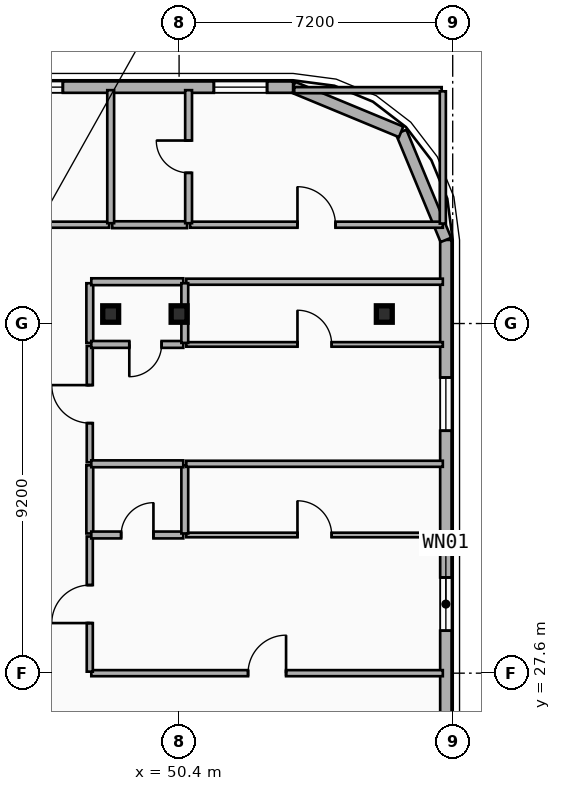
"""IFC4 building model, lengths in metres.
Left out: names, types, materials, properties, quantities, classifications, styles, units other than length and angle.
Written with IfcOpenShell. Run it as: python <this file> out.ifc"""

import sys

from ifc_helpers import new_model, si_unit, direction, frame, frame_2d, origin, origin_2d, place, context, subcontext, project, spatial, rectangle, i_section, extrude, element, fill, save


model = new_model("IFC4")
c1 = context("Model", 3, precision=1e-05, world=origin(), true_north=direction((0.0, 1.0)))
c2 = subcontext(c1, "Body", "Model", "MODEL_VIEW")
j1 = project(units=[si_unit("LENGTHUNIT", "METRE"), si_unit("PLANEANGLEUNIT", "RADIAN")], contexts=[c1])
p1 = place(None, origin())
s1 = spatial("IfcSite", under=j1, at=p1, CompositionType="ELEMENT")
p2 = place(p1, origin())
s2 = spatial("IfcBuilding", under=s1, at=p2, CompositionType="ELEMENT")
p3 = place(p2, frame((0.0, 0.0, 101.3)))
s3 = spatial("IfcBuildingStorey", under=s2, at=p3, CompositionType="ELEMENT", Elevation=101.3)
for number, where, z_axis, x_axis in (
    (1, (48.6, 37.05, 0.0), (0.0, 0.0, 1.0), (1.0, 0.0, 0.0)),
    (2, (50.4, 37.05, 0.0), (0.0, 0.0, 1.0), (1.0, 0.0, 0.0)),
    (3, (55.8, 37.05, 0.0), (0.0, 0.0, 1.0), (1.0, 0.0, 0.0)),
):
    element("IfcColumn", number, at=place(p3, frame(where, z_axis=z_axis, x_axis=x_axis)), inside=s3, PredefinedType="COLUMN", context=c2, shape_type="SweptSolid", body=[
        extrude(i_section(OverallWidth=0.418, OverallDepth=0.432, WebThickness=0.035, FlangeThickness=0.056, FilletRadius=0.015, at=origin_2d()), origin(), (0.0, 0.0, 1.0), 3.5),
    ])
p4 = place(p3, frame((57.42, 39.0, 0.0), z_axis=(0.0, 0.0, 1.0), x_axis=(0.0, -1.0, 0.0)))
e4 = element("IfcWall", 4, at=p4, inside=s3, PredefinedType="SOLIDWALL", context=c2, shape_type="SweptSolid", body=[
    extrude(rectangle(XDim=18.0, YDim=0.3, at=frame_2d((9.0, 0.0))), origin(), (0.0, 0.0, 1.0), 3.24),
])
p5 = place(p4, frame((8.882, 0.0, 0.48)))
e5 = element("IfcOpeningElement", 5, at=p5, cuts=e4, PredefinedType="OPENING", context=c2, shape_type="SweptSolid", body=[
    extrude(rectangle(XDim=1.4, YDim=1.8, at=frame_2d((0.7, 0.9))), frame((0.0, 0.16, 0.0), z_axis=(0.0, -1.0, 0.0), x_axis=(1.0, 0.0, 0.0)), (0.0, 0.0, 1.0), 0.32),
])
p6 = place(p4, frame((3.621, 0.0, 0.48)))
e6 = element("IfcOpeningElement", 6, at=p6, cuts=e4, PredefinedType="OPENING", context=c2, shape_type="SweptSolid", body=[
    extrude(rectangle(XDim=1.4, YDim=1.8, at=frame_2d((0.7, 0.9))), frame((0.0, 0.16, 0.0), z_axis=(0.0, -1.0, 0.0), x_axis=(1.0, 0.0, 0.0)), (0.0, 0.0, 1.0), 0.32),
])
p7 = place(p4, frame((14.655, 0.0, 0.48)))
e7 = element("IfcOpeningElement", 7, at=p7, cuts=e4, PredefinedType="OPENING", context=c2, shape_type="SweptSolid", body=[
    extrude(rectangle(XDim=1.4, YDim=1.8, at=frame_2d((0.7, 0.9))), frame((0.0, 0.16, 0.0), z_axis=(0.0, -1.0, 0.0), x_axis=(1.0, 0.0, 0.0)), (0.0, 0.0, 1.0), 0.32),
])
p8 = place(p3, frame((56.243, 41.843, 0.0), z_axis=(0.0, 0.0, 1.0), x_axis=(0.382636798336, -0.92389884758, 0.0)))
e8 = element("IfcWall", 8, at=p8, inside=s3, PredefinedType="SOLIDWALL", context=c2, shape_type="SweptSolid", body=[
    extrude(rectangle(XDim=3.077, YDim=0.3, at=frame_2d((1.538, 0.0))), origin(), (0.0, 0.0, 1.0), 3.24),
])
p9 = place(p3, frame((53.4, 43.02, 0.0), z_axis=(0.0, 0.0, 1.0), x_axis=(0.923882414032, -0.382676475685, 0.0)))
e9 = element("IfcWall", 9, at=p9, inside=s3, PredefinedType="SOLIDWALL", context=c2, shape_type="SweptSolid", body=[
    extrude(rectangle(XDim=3.077, YDim=0.3, at=frame_2d((1.539, 0.0))), origin(), (0.0, 0.0, 1.0), 3.24),
])
p10 = place(p3, frame((4.2, 43.02, 0.0), z_axis=(0.0, 0.0, 1.0), x_axis=(1.0, 0.0, 0.0)))
e10 = element("IfcWall", 10, at=p10, inside=s3, PredefinedType="SOLIDWALL", context=c2, shape_type="SweptSolid", body=[
    extrude(rectangle(XDim=49.2, YDim=0.3, at=frame_2d((24.6, 0.0))), origin(), (0.0, 0.0, 1.0), 3.24),
])
p11 = place(p10, frame((11.657, 0.0, 0.85)))
e11 = element("IfcOpeningElement", 11, at=p11, cuts=e10, PredefinedType="OPENING", context=c2, shape_type="SweptSolid", body=[
    extrude(rectangle(XDim=1.4, YDim=1.8, at=frame_2d((0.7, 0.9))), frame((0.0, 0.16, 0.0), z_axis=(0.0, -1.0, 0.0), x_axis=(1.0, 0.0, 0.0)), (0.0, 0.0, 1.0), 0.32),
])
p12 = place(p10, frame((20.053, 0.0, 0.85)))
e12 = element("IfcOpeningElement", 12, at=p12, cuts=e10, PredefinedType="OPENING", context=c2, shape_type="SweptSolid", body=[
    extrude(rectangle(XDim=1.4, YDim=1.8, at=frame_2d((0.7, 0.9))), frame((0.0, 0.16, 0.0), z_axis=(0.0, -1.0, 0.0), x_axis=(1.0, 0.0, 0.0)), (0.0, 0.0, 1.0), 0.32),
])
p13 = place(p10, frame((29.789, 0.0, 0.85)))
e13 = element("IfcOpeningElement", 13, at=p13, cuts=e10, PredefinedType="OPENING", context=c2, shape_type="SweptSolid", body=[
    extrude(rectangle(XDim=1.4, YDim=1.8, at=frame_2d((0.7, 0.9))), frame((0.0, 0.16, 0.0), z_axis=(0.0, -1.0, 0.0), x_axis=(1.0, 0.0, 0.0)), (0.0, 0.0, 1.0), 0.32),
])
p14 = place(p10, frame((31.928, 0.0, 0.85)))
e14 = element("IfcOpeningElement", 14, at=p14, cuts=e10, PredefinedType="OPENING", context=c2, shape_type="SweptSolid", body=[
    extrude(rectangle(XDim=1.4, YDim=1.8, at=frame_2d((0.7, 0.9))), frame((0.0, 0.16, 0.0), z_axis=(0.0, -1.0, 0.0), x_axis=(1.0, 0.0, 0.0)), (0.0, 0.0, 1.0), 0.32),
])
p15 = place(p10, frame((39.382, 0.0, 0.85)))
e15 = element("IfcOpeningElement", 15, at=p15, cuts=e10, PredefinedType="OPENING", context=c2, shape_type="SweptSolid", body=[
    extrude(rectangle(XDim=1.4, YDim=1.8, at=frame_2d((0.7, 0.9))), frame((0.0, 0.16, 0.0), z_axis=(0.0, -1.0, 0.0), x_axis=(1.0, 0.0, 0.0)), (0.0, 0.0, 1.0), 0.32),
])
p16 = place(p10, frame((41.741, 0.0, 0.85)))
e16 = element("IfcOpeningElement", 16, at=p16, cuts=e10, PredefinedType="OPENING", context=c2, shape_type="SweptSolid", body=[
    extrude(rectangle(XDim=1.4, YDim=1.8, at=frame_2d((0.7, 0.9))), frame((0.0, 0.16, 0.0), z_axis=(0.0, -1.0, 0.0), x_axis=(1.0, 0.0, 0.0)), (0.0, 0.0, 1.0), 0.32),
])
p17 = place(p10, frame((47.115, 0.0, 0.85)))
e17 = element("IfcOpeningElement", 17, at=p17, cuts=e10, PredefinedType="OPENING", context=c2, shape_type="SweptSolid", body=[
    extrude(rectangle(XDim=1.4, YDim=1.8, at=frame_2d((0.7, 0.9))), frame((0.0, 0.16, 0.0), z_axis=(0.0, -1.0, 0.0), x_axis=(1.0, 0.0, 0.0)), (0.0, 0.0, 1.0), 0.32),
])
p18 = place(p3, frame((48.09, 27.6, 0.0), z_axis=(0.0, 0.0, 1.0), x_axis=(1.0, 0.0, 0.0)))
e18 = element("IfcWall", 18, at=p18, inside=s3, PredefinedType="PARTITIONING", context=c2, shape_type="SweptSolid", body=[
    extrude(rectangle(XDim=9.25, YDim=0.16, at=frame_2d((4.625, 0.0))), origin(), (0.0, 0.0, 1.0), 2.57),
])
p19 = place(p18, frame((4.125, 0.0, 0.0)))
e19 = element("IfcOpeningElement", 19, at=p19, cuts=e18, PredefinedType="OPENING", context=c2, shape_type="SweptSolid", body=[
    extrude(rectangle(XDim=1.0, YDim=2.15, at=frame_2d((0.5, 1.075))), frame((0.0, 0.09, 0.0), z_axis=(0.0, -1.0, 0.0), x_axis=(1.0, 0.0, 0.0)), (0.0, 0.0, 1.0), 0.18),
])
p20 = place(p3, frame((48.05, 27.64, 0.0), z_axis=(0.0, 0.0, 1.0), x_axis=(0.0, 1.0, 0.0)))
e20 = element("IfcWall", 20, at=p20, inside=s3, PredefinedType="PARTITIONING", context=c2, shape_type="SweptSolid", body=[
    extrude(rectangle(XDim=3.556, YDim=0.16, at=frame_2d((1.778, 0.0))), origin(), (0.0, 0.0, 1.0), 3.24),
])
p21 = place(p20, frame((1.278, 0.0, 0.0)))
e21 = element("IfcOpeningElement", 21, at=p21, cuts=e20, PredefinedType="OPENING", context=c2, shape_type="SweptSolid", body=[
    extrude(rectangle(XDim=1.0, YDim=2.15, at=frame_2d((0.5, 1.075))), frame((0.0, 0.09, 0.0), z_axis=(0.0, -1.0, 0.0), x_axis=(1.0, 0.0, 0.0)), (0.0, 0.0, 1.0), 0.18),
])
p22 = place(p3, frame((48.05, 31.276, 0.0), z_axis=(0.0, 0.0, 1.0), x_axis=(0.0, 1.0, 0.0)))
e22 = element("IfcWall", 22, at=p22, inside=s3, PredefinedType="PLUMBINGWALL", context=c2, shape_type="SweptSolid", body=[
    extrude(rectangle(XDim=1.793, YDim=0.18, at=frame_2d((0.896, 0.0))), origin(), (0.0, 0.0, 1.0), 3.24),
])
p23 = place(p3, frame((48.05, 33.149, 0.0), z_axis=(0.0, 0.0, 1.0), x_axis=(0.0, 1.0, 0.0)))
e23 = element("IfcWall", 23, at=p23, inside=s3, PredefinedType="PARTITIONING", context=c2, shape_type="SweptSolid", body=[
    extrude(rectangle(XDim=3.061, YDim=0.16, at=frame_2d((1.531, 0.0))), origin(), (0.0, 0.0, 1.0), 3.24),
])
p24 = place(p23, frame((1.031, 0.0, 0.0)))
e24 = element("IfcOpeningElement", 24, at=p24, cuts=e23, PredefinedType="OPENING", context=c2, shape_type="SweptSolid", body=[
    extrude(rectangle(XDim=1.0, YDim=2.15, at=frame_2d((0.5, 1.075))), frame((0.0, 0.09, 0.0), z_axis=(0.0, -1.0, 0.0), x_axis=(1.0, 0.0, 0.0)), (0.0, 0.0, 1.0), 0.18),
])
p25 = place(p3, frame((48.05, 36.29, 0.0), z_axis=(0.0, 0.0, 1.0), x_axis=(0.0, 1.0, 0.0)))
e25 = element("IfcWall", 25, at=p25, inside=s3, PredefinedType="PLUMBINGWALL", context=c2, shape_type="SweptSolid", body=[
    extrude(rectangle(XDim=1.57, YDim=0.18, at=frame_2d((0.785, 0.0))), origin(), (0.0, 0.0, 1.0), 2.72),
])
p26 = place(p3, frame((48.09, 37.9, 0.0), z_axis=(0.0, 0.0, 1.0), x_axis=(1.0, 0.0, 0.0)))
e26 = element("IfcWall", 26, at=p26, inside=s3, PredefinedType="PLUMBINGWALL", context=c2, shape_type="SweptSolid", body=[
    extrude(rectangle(XDim=2.42, YDim=0.18, at=frame_2d((1.21, 0.0))), origin(), (0.0, 0.0, 1.0), 3.24),
])
p27 = place(p3, frame((50.59, 37.9, 0.0), z_axis=(0.0, 0.0, 1.0), x_axis=(1.0, 0.0, 0.0)))
e27 = element("IfcWall", 27, at=p27, inside=s3, PredefinedType="PARTITIONING", context=c2, shape_type="SweptSolid", body=[
    extrude(rectangle(XDim=6.75, YDim=0.16, at=frame_2d((3.375, 0.0))), origin(), (0.0, 0.0, 1.0), 3.24),
])
p28 = place(p3, frame((42.363, 39.4, 0.0), z_axis=(0.0, 0.0, 1.0), x_axis=(1.0, 0.0, 0.0)))
e28 = element("IfcWall", 28, at=p28, inside=s3, PredefinedType="PARTITIONING", context=c2, shape_type="SweptSolid", body=[
    extrude(rectangle(XDim=6.197, YDim=0.16, at=frame_2d((3.099, 0.0))), origin(), (0.0, 0.0, 1.0), 3.24),
])
p29 = place(p28, frame((2.598, 0.0, 0.0)))
e29 = element("IfcOpeningElement", 29, at=p29, cuts=e28, PredefinedType="OPENING", context=c2, shape_type="SweptSolid", body=[
    extrude(rectangle(XDim=1.0, YDim=2.15, at=frame_2d((0.5, 1.075))), frame((0.0, 0.09, 0.0), z_axis=(0.0, -1.0, 0.0), x_axis=(1.0, 0.0, 0.0)), (0.0, 0.0, 1.0), 0.18),
])
p30 = place(p3, frame((50.69, 39.4, 0.0), z_axis=(0.0, 0.0, 1.0), x_axis=(1.0, 0.0, 0.0)))
e30 = element("IfcWall", 30, at=p30, inside=s3, PredefinedType="PARTITIONING", context=c2, shape_type="SweptSolid", body=[
    extrude(rectangle(XDim=6.65, YDim=0.16, at=frame_2d((3.325, 0.0))), origin(), (0.0, 0.0, 1.0), 3.24),
])
p31 = place(p30, frame((2.825, 0.0, 0.0)))
e31 = element("IfcOpeningElement", 31, at=p31, cuts=e30, PredefinedType="OPENING", context=c2, shape_type="SweptSolid", body=[
    extrude(rectangle(XDim=1.0, YDim=2.15, at=frame_2d((0.5, 1.075))), frame((0.0, 0.09, 0.0), z_axis=(0.0, -1.0, 0.0), x_axis=(1.0, 0.0, 0.0)), (0.0, 0.0, 1.0), 0.18),
])
p32 = place(p3, frame((48.64, 39.4, 0.0), z_axis=(0.0, 0.0, 1.0), x_axis=(1.0, 0.0, 0.0)))
e32 = element("IfcWall", 32, at=p32, inside=s3, PredefinedType="PLUMBINGWALL", context=c2, shape_type="SweptSolid", body=[
    extrude(rectangle(XDim=1.97, YDim=0.18, at=frame_2d((0.985, 0.0))), origin(), (0.0, 0.0, 1.0), 3.24),
])
p33 = place(p3, frame((48.09, 31.236, 0.0), z_axis=(0.0, 0.0, 1.0), x_axis=(1.0, 0.0, 0.0)))
e33 = element("IfcWall", 33, at=p33, inside=s3, PredefinedType="PLUMBINGWALL", context=c2, shape_type="SweptSolid", body=[
    extrude(rectangle(XDim=2.42, YDim=0.18, at=frame_2d((1.21, 0.0))), origin(), (0.0, 0.0, 1.0), 2.57),
])
p34 = place(p33, frame((0.785, 0.0, 0.0)))
e34 = element("IfcOpeningElement", 34, at=p34, cuts=e33, PredefinedType="OPENING", context=c2, shape_type="SweptSolid", body=[
    extrude(rectangle(XDim=0.85, YDim=2.1, at=frame_2d((0.425, 1.05))), frame((0.0, 0.1, 0.0), z_axis=(0.0, -1.0, 0.0), x_axis=(1.0, 0.0, 0.0)), (0.0, 0.0, 1.0), 0.2),
])
p35 = place(p3, frame((50.59, 31.236, 0.0), z_axis=(0.0, 0.0, 1.0), x_axis=(1.0, 0.0, 0.0)))
e35 = element("IfcWall", 35, at=p35, inside=s3, PredefinedType="PARTITIONING", context=c2, shape_type="SweptSolid", body=[
    extrude(rectangle(XDim=6.75, YDim=0.12, at=frame_2d((3.375, 0.0))), origin(), (0.0, 0.0, 1.0), 2.57),
])
p36 = place(p35, frame((2.925, 0.0, 0.0)))
e36 = element("IfcOpeningElement", 36, at=p36, cuts=e35, PredefinedType="OPENING", context=c2, shape_type="SweptSolid", body=[
    extrude(rectangle(XDim=0.9, YDim=2.1, at=frame_2d((0.45, 1.05))), frame((0.0, 0.07, 0.0), z_axis=(0.0, -1.0, 0.0), x_axis=(1.0, 0.0, 0.0)), (0.0, 0.0, 1.0), 0.14),
])
p37 = place(p3, frame((50.55, 31.276, 0.0), z_axis=(0.0, 0.0, 1.0), x_axis=(0.0, 1.0, 0.0)))
e37 = element("IfcWall", 37, at=p37, inside=s3, PredefinedType="PLUMBINGWALL", context=c2, shape_type="SweptSolid", body=[
    extrude(rectangle(XDim=1.793, YDim=0.18, at=frame_2d((0.896, 0.0))), origin(), (0.0, 0.0, 1.0), 2.57),
])
p38 = place(p3, frame((48.09, 33.109, 0.0), z_axis=(0.0, 0.0, 1.0), x_axis=(1.0, 0.0, 0.0)))
e38 = element("IfcWall", 38, at=p38, inside=s3, PredefinedType="PLUMBINGWALL", context=c2, shape_type="SweptSolid", body=[
    extrude(rectangle(XDim=2.42, YDim=0.18, at=frame_2d((1.21, 0.0))), origin(), (0.0, 0.0, 1.0), 2.57),
])
p39 = place(p3, frame((50.59, 33.109, 0.0), z_axis=(0.0, 0.0, 1.0), x_axis=(1.0, 0.0, 0.0)))
e39 = element("IfcWall", 39, at=p39, inside=s3, PredefinedType="PARTITIONING", context=c2, shape_type="SweptSolid", body=[
    extrude(rectangle(XDim=6.75, YDim=0.16, at=frame_2d((3.375, 0.0))), origin(), (0.0, 0.0, 1.0), 2.57),
])
p40 = place(p3, frame((50.51, 36.25, 0.0), z_axis=(0.0, 0.0, 1.0), x_axis=(-1.0, 0.0, 0.0)))
e40 = element("IfcWall", 40, at=p40, inside=s3, PredefinedType="PLUMBINGWALL", context=c2, shape_type="SweptSolid", body=[
    extrude(rectangle(XDim=2.42, YDim=0.18, at=frame_2d((1.21, 0.0))), origin(), (0.0, 0.0, 1.0), 2.57),
])
p41 = place(p40, frame((0.57, 0.0, 0.0)))
e41 = element("IfcOpeningElement", 41, at=p41, cuts=e40, PredefinedType="OPENING", context=c2, shape_type="SweptSolid", body=[
    extrude(rectangle(XDim=0.85, YDim=2.1, at=frame_2d((0.425, 1.05))), frame((0.0, 0.1, 0.0), z_axis=(0.0, -1.0, 0.0), x_axis=(1.0, 0.0, 0.0)), (0.0, 0.0, 1.0), 0.2),
])
p42 = place(p3, frame((50.59, 36.25, 0.0), z_axis=(0.0, 0.0, 1.0), x_axis=(1.0, 0.0, 0.0)))
e42 = element("IfcWall", 42, at=p42, inside=s3, PredefinedType="PARTITIONING", context=c2, shape_type="SweptSolid", body=[
    extrude(rectangle(XDim=6.75, YDim=0.12, at=frame_2d((3.375, 0.0))), origin(), (0.0, 0.0, 1.0), 2.57),
])
p43 = place(p42, frame((2.925, 0.0, 0.0)))
e43 = element("IfcOpeningElement", 43, at=p43, cuts=e42, PredefinedType="OPENING", context=c2, shape_type="SweptSolid", body=[
    extrude(rectangle(XDim=0.9, YDim=2.1, at=frame_2d((0.45, 1.05))), frame((0.0, 0.07, 0.0), z_axis=(0.0, -1.0, 0.0), x_axis=(1.0, 0.0, 0.0)), (0.0, 0.0, 1.0), 0.14),
])
p44 = place(p3, frame((50.55, 36.29, 0.0), z_axis=(0.0, 0.0, 1.0), x_axis=(0.0, 1.0, 0.0)))
e44 = element("IfcWall", 44, at=p44, inside=s3, PredefinedType="PLUMBINGWALL", context=c2, shape_type="SweptSolid", body=[
    extrude(rectangle(XDim=1.57, YDim=0.18, at=frame_2d((0.785, 0.0))), origin(), (0.0, 0.0, 1.0), 2.57),
])
p45 = place(p3, frame((48.6, 39.44, 0.0), z_axis=(0.0, 0.0, 1.0), x_axis=(0.0, 1.0, 0.0)))
e45 = element("IfcWall", 45, at=p45, inside=s3, PredefinedType="PLUMBINGWALL", context=c2, shape_type="SweptSolid", body=[
    extrude(rectangle(XDim=3.5, YDim=0.18, at=frame_2d((1.75, 0.0))), origin(), (0.0, 0.0, 1.0), 3.24),
])
p46 = place(p3, frame((50.65, 39.44, 0.0), z_axis=(0.0, 0.0, 1.0), x_axis=(0.0, 1.0, 0.0)))
e46 = element("IfcWall", 46, at=p46, inside=s3, PredefinedType="PLUMBINGWALL", context=c2, shape_type="SweptSolid", body=[
    extrude(rectangle(XDim=3.5, YDim=0.18, at=frame_2d((1.75, 0.0))), origin(), (0.0, 0.0, 1.0), 3.24),
])
p47 = place(p46, frame((1.325, 0.0, 0.0)))
e47 = element("IfcOpeningElement", 47, at=p47, cuts=e46, PredefinedType="OPENING", context=c2, shape_type="SweptSolid", body=[
    extrude(rectangle(XDim=0.85, YDim=2.1, at=frame_2d((0.425, 1.05))), frame((0.0, 0.1, 0.0), z_axis=(0.0, -1.0, 0.0), x_axis=(1.0, 0.0, 0.0)), (0.0, 0.0, 1.0), 0.2),
])
p48 = place(p3, frame((53.43, 42.94, 0.0), z_axis=(0.0, 0.0, 1.0), x_axis=(1.0, 0.0, 0.0)))
e48 = element("IfcWall", 48, at=p48, inside=s3, PredefinedType="PARTITIONING", context=c2, shape_type="SweptSolid", body=[
    extrude(rectangle(XDim=3.88, YDim=0.16, at=frame_2d((1.94, 0.0))), origin(), (0.0, 0.0, 1.0), 3.24),
])
p49 = place(p3, frame((57.34, 39.43, 0.0), z_axis=(0.0, 0.0, 1.0), x_axis=(0.0, 1.0, 0.0)))
e49 = element("IfcWall", 49, at=p49, inside=s3, PredefinedType="PARTITIONING", context=c2, shape_type="SweptSolid", body=[
    extrude(rectangle(XDim=3.48, YDim=0.16, at=frame_2d((1.74, 0.0))), origin(), (0.0, 0.0, 1.0), 3.24),
])
p50 = place(p5, origin())
e50 = element("IfcWindow", 50, at=p50, inside=s3, PartitioningType="SINGLE_PANEL", PredefinedType="WINDOW", context=c2, shape_type="SweptSolid", body=[
    extrude(rectangle(XDim=1.4, YDim=1.8, at=frame_2d((0.7, 0.9))), frame((0.0, 0.03, 0.0), z_axis=(0.0, -1.0, 0.0), x_axis=(1.0, 0.0, 0.0)), (0.0, 0.0, 1.0), 0.06),
])
fill(e5, e50)
p51 = place(p6, origin())
e51 = element("IfcWindow", 51, at=p51, inside=s3, PartitioningType="SINGLE_PANEL", PredefinedType="WINDOW", context=c2, shape_type="SweptSolid", body=[
    extrude(rectangle(XDim=1.4, YDim=1.8, at=frame_2d((0.7, 0.9))), frame((0.0, 0.03, 0.0), z_axis=(0.0, -1.0, 0.0), x_axis=(1.0, 0.0, 0.0)), (0.0, 0.0, 1.0), 0.06),
])
fill(e6, e51)
p52 = place(p16, origin())
e52 = element("IfcWindow", 52, at=p52, inside=s3, PartitioningType="SINGLE_PANEL", PredefinedType="WINDOW", context=c2, shape_type="SweptSolid", body=[
    extrude(rectangle(XDim=1.4, YDim=1.8, at=frame_2d((0.7, 0.9))), frame((0.0, 0.03, 0.0), z_axis=(0.0, -1.0, 0.0), x_axis=(1.0, 0.0, 0.0)), (0.0, 0.0, 1.0), 0.06),
])
fill(e16, e52)
p53 = place(p17, origin())
e53 = element("IfcWindow", 53, at=p53, inside=s3, PartitioningType="SINGLE_PANEL", PredefinedType="WINDOW", context=c2, shape_type="SweptSolid", body=[
    extrude(rectangle(XDim=1.4, YDim=1.8, at=frame_2d((0.7, 0.9))), frame((0.0, 0.03, 0.0), z_axis=(0.0, -1.0, 0.0), x_axis=(1.0, 0.0, 0.0)), (0.0, 0.0, 1.0), 0.06),
])
fill(e17, e53)
p54 = place(p19, origin())
e54 = element("IfcDoor", 54, at=p54, inside=s3, OperationType="SINGLE_SWING_RIGHT", PredefinedType="DOOR", context=c2, shape_type="SweptSolid", body=[
    extrude(rectangle(XDim=1.0, YDim=2.15, at=frame_2d((0.5, 1.075))), frame((0.0, 0.025, 0.0), z_axis=(0.0, -1.0, 0.0), x_axis=(1.0, 0.0, 0.0)), (0.0, 0.0, 1.0), 0.05),
])
fill(e19, e54)
p55 = place(p21, origin())
e55 = element("IfcDoor", 55, at=p55, inside=s3, OperationType="SINGLE_SWING_LEFT", PredefinedType="DOOR", context=c2, shape_type="SweptSolid", body=[
    extrude(rectangle(XDim=1.0, YDim=2.15, at=frame_2d((0.5, 1.075))), frame((0.0, 0.025, 0.0), z_axis=(0.0, -1.0, 0.0), x_axis=(1.0, 0.0, 0.0)), (0.0, 0.0, 1.0), 0.05),
])
fill(e21, e55)
p56 = place(p24, origin())
e56 = element("IfcDoor", 56, at=p56, inside=s3, OperationType="SINGLE_SWING_RIGHT", PredefinedType="DOOR", context=c2, shape_type="SweptSolid", body=[
    extrude(rectangle(XDim=1.0, YDim=2.15, at=frame_2d((0.5, 1.075))), frame((0.0, 0.025, 0.0), z_axis=(0.0, -1.0, 0.0), x_axis=(1.0, 0.0, 0.0)), (0.0, 0.0, 1.0), 0.05),
])
fill(e24, e56)
p57 = place(p31, origin())
e57 = element("IfcDoor", 57, at=p57, inside=s3, OperationType="SINGLE_SWING_LEFT", PredefinedType="DOOR", context=c2, shape_type="SweptSolid", body=[
    extrude(rectangle(XDim=1.0, YDim=2.15, at=frame_2d((0.5, 1.075))), frame((0.0, 0.025, 0.0), z_axis=(0.0, -1.0, 0.0), x_axis=(1.0, 0.0, 0.0)), (0.0, 0.0, 1.0), 0.05),
])
fill(e31, e57)
p58 = place(p34, origin())
e58 = element("IfcDoor", 58, at=p58, inside=s3, OperationType="SINGLE_SWING_RIGHT", PredefinedType="DOOR", context=c2, shape_type="SweptSolid", body=[
    extrude(rectangle(XDim=0.85, YDim=2.1, at=frame_2d((0.425, 1.05))), frame((0.0, 0.025, 0.0), z_axis=(0.0, -1.0, 0.0), x_axis=(1.0, 0.0, 0.0)), (0.0, 0.0, 1.0), 0.05),
])
fill(e34, e58)
p59 = place(p36, origin())
e59 = element("IfcDoor", 59, at=p59, inside=s3, OperationType="SINGLE_SWING_LEFT", PredefinedType="DOOR", context=c2, shape_type="SweptSolid", body=[
    extrude(rectangle(XDim=0.9, YDim=2.1, at=frame_2d((0.45, 1.05))), frame((0.0, 0.025, 0.0), z_axis=(0.0, -1.0, 0.0), x_axis=(1.0, 0.0, 0.0)), (0.0, 0.0, 1.0), 0.05),
])
fill(e36, e59)
p60 = place(p41, origin())
e60 = element("IfcDoor", 60, at=p60, inside=s3, OperationType="SINGLE_SWING_RIGHT", PredefinedType="DOOR", context=c2, shape_type="SweptSolid", body=[
    extrude(rectangle(XDim=0.85, YDim=2.1, at=frame_2d((0.425, 1.05))), frame((0.0, 0.025, 0.0), z_axis=(0.0, -1.0, 0.0), x_axis=(1.0, 0.0, 0.0)), (0.0, 0.0, 1.0), 0.05),
])
fill(e41, e60)
p61 = place(p43, origin())
e61 = element("IfcDoor", 61, at=p61, inside=s3, OperationType="SINGLE_SWING_LEFT", PredefinedType="DOOR", context=c2, shape_type="SweptSolid", body=[
    extrude(rectangle(XDim=0.9, YDim=2.1, at=frame_2d((0.45, 1.05))), frame((0.0, 0.025, 0.0), z_axis=(0.0, -1.0, 0.0), x_axis=(1.0, 0.0, 0.0)), (0.0, 0.0, 1.0), 0.05),
])
fill(e43, e61)
p62 = place(p47, origin())
e62 = element("IfcDoor", 62, at=p62, inside=s3, OperationType="SINGLE_SWING_RIGHT", PredefinedType="DOOR", context=c2, shape_type="SweptSolid", body=[
    extrude(rectangle(XDim=0.85, YDim=2.1, at=frame_2d((0.425, 1.05))), frame((0.0, 0.025, 0.0), z_axis=(0.0, -1.0, 0.0), x_axis=(1.0, 0.0, 0.0)), (0.0, 0.0, 1.0), 0.05),
])
fill(e47, e62)
save(model, sys.argv[1])
